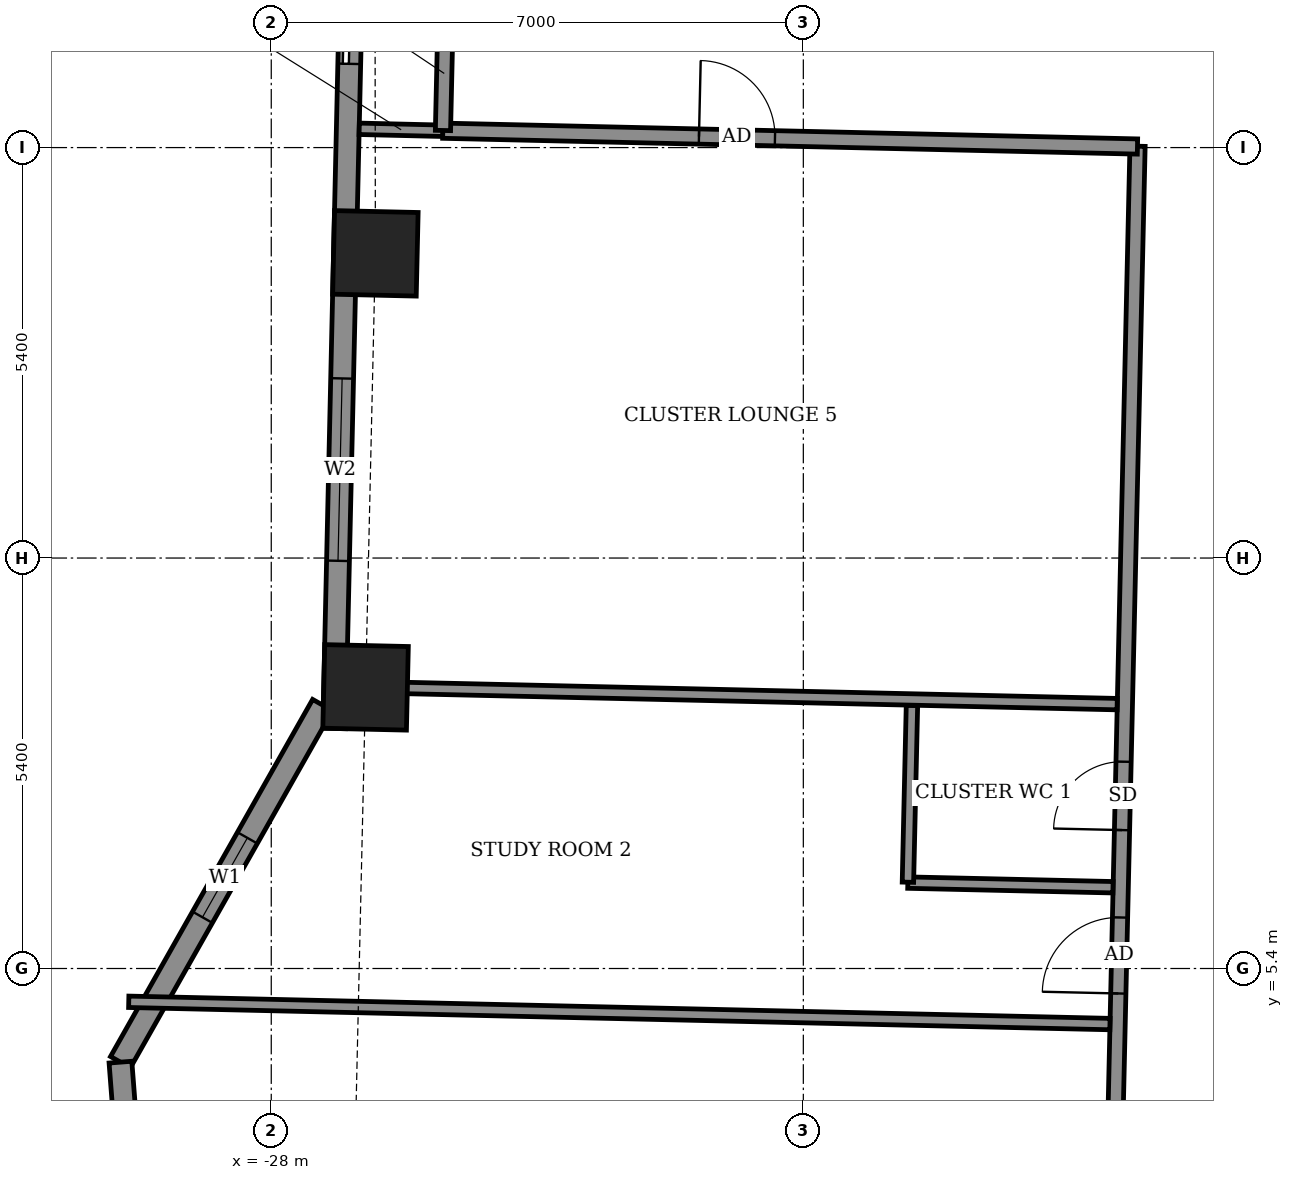
"""IFC4 building model, lengths in metres.
Left out: names, types, materials, properties, quantities, classifications, styles, units other than length and angle.
Written with IfcOpenShell. Run it as: python <this file> out.ifc"""

import sys

from ifc_helpers import new_model, si_unit, direction, frame, frame_2d, origin, origin_2d, place, context, subcontext, project, spatial, rectangle, extrude, element, fill, save


model = new_model("IFC4")
c1 = context("Model", 3, precision=1e-05, world=origin(), true_north=direction((0.0, 1.0)))
c2 = subcontext(c1, "Body", "Model", "MODEL_VIEW")
j1 = project(units=[si_unit("LENGTHUNIT", "METRE"), si_unit("PLANEANGLEUNIT", "RADIAN")], contexts=[c1])
p1 = place(None, origin())
s1 = spatial("IfcSite", under=j1, at=p1, CompositionType="ELEMENT")
p2 = place(p1, origin())
s2 = spatial("IfcBuilding", under=s1, at=p2, CompositionType="ELEMENT")
p3 = place(p2, frame((0.0, 0.0, 212.3)))
s3 = spatial("IfcBuildingStorey", under=s2, at=p3, CompositionType="ELEMENT", Elevation=212.3)
for number, where, z_axis, x_axis in (
    (1, (-26.63, 14.809, -0.55), (0.0, 0.0, 1.0), (-0.023, -1.0, 0.0)),
    (2, (-26.759, 9.099, -0.55), (0.0, 0.0, 1.0), (-0.023, -1.0, 0.0)),
):
    element("IfcColumn", number, at=place(p3, frame(where, z_axis=z_axis, x_axis=x_axis)), inside=s3, PredefinedType="COLUMN", context=c2, shape_type="SweptSolid", body=[
        extrude(rectangle(XDim=1.1, YDim=1.1, at=origin_2d()), origin(), (0.0, 0.0, 1.0), 3.6),
    ])
p4 = place(p3, frame((-26.904, 20.379, 0.0), z_axis=(0.0, 0.0, 1.0), x_axis=(-0.022671687694, -0.999742964255, 0.0)))
e3 = element("IfcWall", 3, at=p4, inside=s3, PredefinedType="SOLIDWALL", context=c2, shape_type="SweptSolid", body=[
    extrude(rectangle(XDim=11.824, YDim=0.3, at=frame_2d((5.912, 0.0))), origin(), (0.0, 0.0, 1.0), 2.55),
])
p5 = place(p4, frame((1.578, 0.0, 0.0)))
e4 = element("IfcOpeningElement", 4, at=p5, cuts=e3, PredefinedType="OPENING", context=c2, shape_type="SweptSolid", body=[
    extrude(rectangle(XDim=1.5, YDim=2.4, at=frame_2d((0.75, 1.2))), frame((0.0, 0.16, 0.0), z_axis=(0.0, -1.0, 0.0), x_axis=(1.0, 0.0, 0.0)), (0.0, 0.0, 1.0), 0.32),
])
p6 = place(p4, frame((7.218, 0.0, 0.9)))
e5 = element("IfcOpeningElement", 5, at=p6, cuts=e3, PredefinedType="OPENING", context=c2, shape_type="SweptSolid", body=[
    extrude(rectangle(XDim=2.4, YDim=1.5, at=frame_2d((1.2, 0.75))), frame((0.0, 0.16, 0.0), z_axis=(0.0, -1.0, 0.0), x_axis=(1.0, 0.0, 0.0)), (0.0, 0.0, 1.0), 0.32),
])
p7 = place(p3, frame((-27.325, 8.866, 0.0), z_axis=(0.0, 0.0, 1.0), x_axis=(-0.492554919955, -0.870281363025, 0.0)))
e6 = element("IfcWall", 6, at=p7, inside=s3, PredefinedType="SOLIDWALL", context=c2, shape_type="SweptSolid", body=[
    extrude(rectangle(XDim=5.398, YDim=0.3, at=frame_2d((2.699, 0.0))), origin(), (0.0, 0.0, 1.0), 3.05),
])
p8 = place(p7, frame((2.008, 0.0, 0.9)))
e7 = element("IfcOpeningElement", 7, at=p8, cuts=e6, PredefinedType="OPENING", context=c2, shape_type="SweptSolid", body=[
    extrude(rectangle(XDim=1.2, YDim=1.5, at=frame_2d((0.6, 0.75))), frame((0.0, 0.16, 0.0), z_axis=(0.0, -1.0, 0.0), x_axis=(1.0, 0.0, 0.0)), (0.0, 0.0, 1.0), 0.32),
])
p9 = place(p3, frame((-29.984, 4.168, 0.0), z_axis=(0.0, 0.0, 1.0), x_axis=(0.076964476481, -0.997033835614, 0.0)))
e8 = element("IfcWall", 8, at=p9, inside=s3, PredefinedType="SOLIDWALL", context=c2, shape_type="SweptSolid", body=[
    extrude(rectangle(XDim=5.573, YDim=0.3, at=frame_2d((2.787, 0.0))), origin(), (0.0, 0.0, 1.0), 3.05),
])
p10 = place(p9, frame((2.186, 0.0, 0.9)))
e9 = element("IfcOpeningElement", 9, at=p10, cuts=e8, PredefinedType="OPENING", context=c2, shape_type="SweptSolid", body=[
    extrude(rectangle(XDim=1.2, YDim=1.5, at=frame_2d((0.6, 0.75))), frame((0.0, 0.16, 0.0), z_axis=(0.0, -1.0, 0.0), x_axis=(1.0, 0.0, 0.0)), (0.0, 0.0, 1.0), 0.32),
])
p11 = place(p3, frame((-29.918, 9.42, 0.0), z_axis=(0.0, 0.0, 1.0), x_axis=(0.022681332769, 0.999742745482, 0.0)))
e10 = element("IfcWall", 10, at=p11, inside=s3, PredefinedType="USERDEFINED", context=c2, shape_type="SweptSolid", body=[
    extrude(rectangle(XDim=3.875, YDim=0.55, at=frame_2d((1.938, 0.0))), origin(), (0.0, 0.0, 1.0), 0.8),
])
p12 = place(p3, frame((-17.247, -12.149, 0.0), z_axis=(0.0, 0.0, 1.0), x_axis=(0.022698146637, 0.999742363881, 0.0)))
e11 = element("IfcWall", 11, at=p12, inside=s3, PredefinedType="PARTITIONING", context=c2, shape_type="SweptSolid", body=[
    extrude(rectangle(XDim=28.374, YDim=0.2, at=frame_2d((14.187, 0.0))), origin(), (0.0, 0.0, 1.0), 3.05),
])
p13 = place(p12, frame((17.225, 0.0, 0.0)))
e12 = element("IfcOpeningElement", 12, at=p13, cuts=e11, PredefinedType="OPENING", context=c2, shape_type="SweptSolid", body=[
    extrude(rectangle(XDim=1.0, YDim=2.1, at=frame_2d((0.5, 1.05))), frame((0.0, 0.11, 0.0), z_axis=(0.0, -1.0, 0.0), x_axis=(1.0, 0.0, 0.0)), (0.0, 0.0, 1.0), 0.22),
])
p14 = place(p12, frame((19.375, 0.0, 0.0)))
e13 = element("IfcOpeningElement", 13, at=p14, cuts=e11, PredefinedType="OPENING", context=c2, shape_type="SweptSolid", body=[
    extrude(rectangle(XDim=0.9, YDim=2.1, at=frame_2d((0.45, 1.05))), frame((0.0, 0.11, 0.0), z_axis=(0.0, -1.0, 0.0), x_axis=(1.0, 0.0, 0.0)), (0.0, 0.0, 1.0), 0.22),
])
p15 = place(p12, frame((13.822, 0.0, 0.0)))
e14 = element("IfcOpeningElement", 14, at=p15, cuts=e11, PredefinedType="OPENING", context=c2, shape_type="SweptSolid", body=[
    extrude(rectangle(XDim=1.0, YDim=2.1, at=frame_2d((0.5, 1.05))), frame((0.0, 0.11, 0.0), z_axis=(0.0, -1.0, 0.0), x_axis=(1.0, 0.0, 0.0)), (0.0, 0.0, 1.0), 0.22),
])
p16 = place(p12, frame((10.25, 0.0, 0.0)))
e15 = element("IfcOpeningElement", 15, at=p16, cuts=e11, PredefinedType="OPENING", context=c2, shape_type="SweptSolid", body=[
    extrude(rectangle(XDim=1.0, YDim=2.1, at=frame_2d((0.5, 1.05))), frame((0.0, 0.11, 0.0), z_axis=(0.0, -1.0, 0.0), x_axis=(1.0, 0.0, 0.0)), (0.0, 0.0, 1.0), 0.22),
])
p17 = place(p12, frame((8.025, 0.0, 0.0)))
e16 = element("IfcOpeningElement", 16, at=p17, cuts=e11, PredefinedType="OPENING", context=c2, shape_type="SweptSolid", body=[
    extrude(rectangle(XDim=0.9, YDim=2.1, at=frame_2d((0.45, 1.05))), frame((0.0, 0.11, 0.0), z_axis=(0.0, -1.0, 0.0), x_axis=(1.0, 0.0, 0.0)), (0.0, 0.0, 1.0), 0.22),
])
p18 = place(p12, frame((5.262, 0.0, 0.0)))
e17 = element("IfcOpeningElement", 17, at=p18, cuts=e11, PredefinedType="OPENING", context=c2, shape_type="SweptSolid", body=[
    extrude(rectangle(XDim=1.0, YDim=2.1, at=frame_2d((0.5, 1.05))), frame((0.0, 0.11, 0.0), z_axis=(0.0, -1.0, 0.0), x_axis=(1.0, 0.0, 0.0)), (0.0, 0.0, 1.0), 0.22),
])
p19 = place(p12, frame((2.825, 0.0, 0.0)))
e18 = element("IfcOpeningElement", 18, at=p19, cuts=e11, PredefinedType="OPENING", context=c2, shape_type="SweptSolid", body=[
    extrude(rectangle(XDim=1.0, YDim=2.1, at=frame_2d((0.5, 1.05))), frame((0.0, 0.11, 0.0), z_axis=(0.0, -1.0, 0.0), x_axis=(1.0, 0.0, 0.0)), (0.0, 0.0, 1.0), 0.22),
])
p20 = place(p12, frame((0.75, 0.0, 0.0)))
e19 = element("IfcOpeningElement", 19, at=p20, cuts=e11, PredefinedType="OPENING", context=c2, shape_type="SweptSolid", body=[
    extrude(rectangle(XDim=0.9, YDim=2.1, at=frame_2d((0.45, 1.05))), frame((0.0, 0.11, 0.0), z_axis=(0.0, -1.0, 0.0), x_axis=(1.0, 0.0, 0.0)), (0.0, 0.0, 1.0), 0.22),
])
p21 = place(p3, frame((-29.875, 4.962, 0.0), z_axis=(0.0, 0.0, 1.0), x_axis=(0.999742567124, -0.022689193013, 0.0)))
e20 = element("IfcWall", 20, at=p21, inside=s3, PredefinedType="PARTITIONING", context=c2, shape_type="SweptSolid", body=[
    extrude(rectangle(XDim=12.912, YDim=0.15, at=frame_2d((6.456, 0.0))), origin(), (0.0, 0.0, 1.0), 2.1),
])
p22 = place(p3, frame((-19.625, 6.53, 0.0), z_axis=(0.0, 0.0, 1.0), x_axis=(0.999744396973, -0.02260842146, 0.0)))
e21 = element("IfcWall", 21, at=p22, inside=s3, PredefinedType="PARTITIONING", context=c2, shape_type="SweptSolid", body=[
    extrude(rectangle(XDim=2.7, YDim=0.15, at=frame_2d((1.35, 0.0))), origin(), (0.0, 0.0, 1.0), 3.05),
])
p23 = place(p3, frame((-19.624, 6.535, 0.0), z_axis=(0.0, 0.0, 1.0), x_axis=(0.022778632478, 0.99974053329, 0.0)))
e22 = element("IfcWall", 22, at=p23, inside=s3, PredefinedType="PARTITIONING", context=c2, shape_type="SweptSolid", body=[
    extrude(rectangle(XDim=2.326, YDim=0.15, at=frame_2d((1.163, 0.0))), origin(), (0.0, 0.0, 1.0), 3.05),
])
p24 = place(p3, frame((-27.01, 9.108, 0.0), z_axis=(0.0, 0.0, 1.0), x_axis=(0.999742841246, -0.022677111331, 0.0)))
e23 = element("IfcWall", 23, at=p24, inside=s3, PredefinedType="PARTITIONING", context=c2, shape_type="SweptSolid", body=[
    extrude(rectangle(XDim=10.142, YDim=0.15, at=frame_2d((5.071, 0.0))), origin(), (0.0, 0.0, 1.0), 3.05),
])
p25 = place(p3, frame((-26.843, 16.447, 0.0), z_axis=(0.0, 0.0, 1.0), x_axis=(0.999720170098, -0.023655475055, 0.0)))
e24 = element("IfcWall", 24, at=p25, inside=s3, PredefinedType="PARTITIONING", context=c2, shape_type="SweptSolid", body=[
    extrude(rectangle(XDim=1.104, YDim=0.15, at=frame_2d((0.552, 0.0))), origin(), (0.0, 0.0, 1.0), 2.55),
])
p26 = place(p3, frame((-25.743, 16.422, 0.0), z_axis=(0.0, 0.0, 1.0), x_axis=(0.999741076645, -0.022754772455, 0.0)))
e25 = element("IfcWall", 25, at=p26, inside=s3, PredefinedType="PARTITIONING", context=c2, shape_type="SweptSolid", body=[
    extrude(rectangle(XDim=9.141, YDim=0.2, at=frame_2d((4.571, 0.0))), origin(), (0.0, 0.0, 1.0), 3.05),
])
p27 = place(p26, frame((3.371, 0.0, 0.0)))
e26 = element("IfcOpeningElement", 26, at=p27, cuts=e25, PredefinedType="OPENING", context=c2, shape_type="SweptSolid", body=[
    extrude(rectangle(XDim=1.0, YDim=2.1, at=frame_2d((0.5, 1.05))), frame((0.0, 0.11, 0.0), z_axis=(0.0, -1.0, 0.0), x_axis=(1.0, 0.0, 0.0)), (0.0, 0.0, 1.0), 0.22),
])
p28 = place(p3, frame((-25.741, 16.425, 0.0), z_axis=(0.0, 0.0, 1.0), x_axis=(0.022617910375, 0.999744182344, 0.0)))
e27 = element("IfcWall", 27, at=p28, inside=s3, PredefinedType="PARTITIONING", context=c2, shape_type="SweptSolid", body=[
    extrude(rectangle(XDim=1.5, YDim=0.2, at=frame_2d((0.75, 0.0))), origin(), (0.0, 0.0, 1.0), 3.05),
])
p29 = place(p5, origin())
e28 = element("IfcDoor", 28, at=p29, inside=s3, OperationType="SLIDING_TO_LEFT", PredefinedType="DOOR", context=c2, shape_type="SweptSolid", body=[
    extrude(rectangle(XDim=1.5, YDim=2.4, at=frame_2d((0.75, 1.2))), frame((0.0, 0.025, 0.0), z_axis=(0.0, -1.0, 0.0), x_axis=(1.0, 0.0, 0.0)), (0.0, 0.0, 1.0), 0.05),
])
fill(e4, e28)
p30 = place(p6, origin())
e29 = element("IfcWindow", 29, at=p30, inside=s3, PartitioningType="DOUBLE_PANEL_VERTICAL", PredefinedType="WINDOW", context=c2, shape_type="SweptSolid", body=[
    extrude(rectangle(XDim=2.4, YDim=1.5, at=frame_2d((1.2, 0.75))), frame((0.0, 0.03, 0.0), z_axis=(0.0, -1.0, 0.0), x_axis=(1.0, 0.0, 0.0)), (0.0, 0.0, 1.0), 0.06),
])
fill(e5, e29)
p31 = place(p8, origin())
e30 = element("IfcWindow", 30, at=p31, inside=s3, PartitioningType="SINGLE_PANEL", PredefinedType="WINDOW", context=c2, shape_type="SweptSolid", body=[
    extrude(rectangle(XDim=1.2, YDim=1.5, at=frame_2d((0.6, 0.75))), frame((0.0, 0.03, 0.0), z_axis=(0.0, -1.0, 0.0), x_axis=(1.0, 0.0, 0.0)), (0.0, 0.0, 1.0), 0.06),
])
fill(e7, e30)
p32 = place(p27, origin())
e31 = element("IfcDoor", 31, at=p32, inside=s3, OperationType="SINGLE_SWING_LEFT", PredefinedType="DOOR", context=c2, shape_type="SweptSolid", body=[
    extrude(rectangle(XDim=1.0, YDim=2.1, at=frame_2d((0.5, 1.05))), frame((0.0, 0.025, 0.0), z_axis=(0.0, -1.0, 0.0), x_axis=(1.0, 0.0, 0.0)), (0.0, 0.0, 1.0), 0.05),
])
fill(e26, e31)
p33 = place(p13, origin())
e32 = element("IfcDoor", 32, at=p33, inside=s3, OperationType="SINGLE_SWING_RIGHT", PredefinedType="DOOR", context=c2, shape_type="SweptSolid", body=[
    extrude(rectangle(XDim=1.0, YDim=2.1, at=frame_2d((0.5, 1.05))), frame((0.0, 0.025, 0.0), z_axis=(0.0, -1.0, 0.0), x_axis=(1.0, 0.0, 0.0)), (0.0, 0.0, 1.0), 0.05),
])
fill(e12, e32)
p34 = place(p14, origin())
e33 = element("IfcDoor", 33, at=p34, inside=s3, OperationType="SINGLE_SWING_RIGHT", PredefinedType="DOOR", context=c2, shape_type="SweptSolid", body=[
    extrude(rectangle(XDim=0.9, YDim=2.1, at=frame_2d((0.45, 1.05))), frame((0.0, 0.025, 0.0), z_axis=(0.0, -1.0, 0.0), x_axis=(1.0, 0.0, 0.0)), (0.0, 0.0, 1.0), 0.05),
])
fill(e13, e33)
save(model, sys.argv[1])
